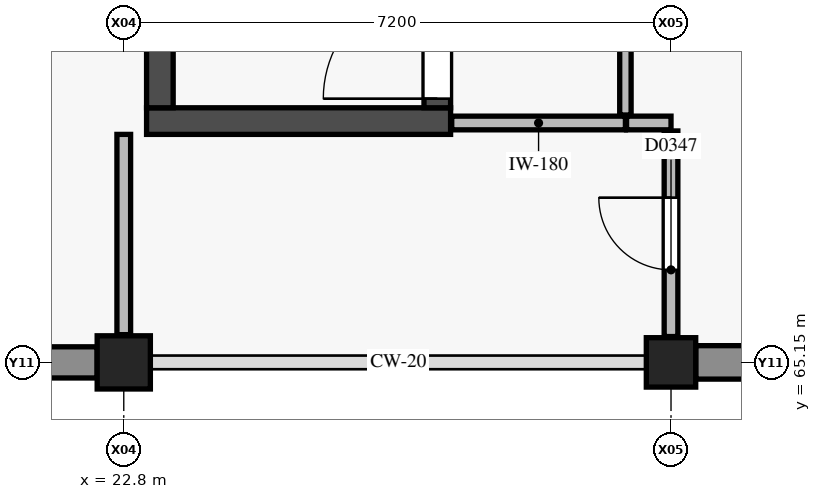
"""IFC4 building model, lengths in metres.
Left out: names, types, materials, properties, quantities, classifications, styles, units other than length and angle.
Written with IfcOpenShell. Run it as: python <this file> out.ifc"""

import sys

from ifc_helpers import new_model, si_unit, direction, frame, frame_2d, origin, origin_2d, place, context, subcontext, project, spatial, rectangle, circle, extrude, element, fill, save


model = new_model("IFC4")
c1 = context("Model", 3, precision=1e-05, world=origin(), true_north=direction((0.0, 1.0)))
c2 = subcontext(c1, "Body", "Model", "MODEL_VIEW")
j1 = project(units=[si_unit("LENGTHUNIT", "METRE"), si_unit("PLANEANGLEUNIT", "RADIAN")], contexts=[c1])
p1 = place(None, origin())
s1 = spatial("IfcSite", under=j1, at=p1, CompositionType="ELEMENT")
p2 = place(p1, origin())
s2 = spatial("IfcBuilding", under=s1, at=p2, CompositionType="ELEMENT")
p3 = place(p2, frame((0.0, 0.0, 4.8)))
s3 = spatial("IfcBuildingStorey", under=s2, at=p3, CompositionType="ELEMENT", Elevation=4.8)
p4 = place(p3, frame((22.8, 65.15, 0.0), z_axis=(0.0, 0.0, 1.0), x_axis=(1.0, 0.0, 0.0)))
e1 = element("IfcColumn", 1, at=p4, inside=s3, PredefinedType="COLUMN", context=c2, shape_type="SweptSolid", body=[
    extrude(circle(Radius=0.35, at=origin_2d()), origin(), (0.0, 0.0, 1.0), 4.2),
])
p5 = place(p3, frame((30.0, 65.15, 0.0), z_axis=(0.0, 0.0, 1.0), x_axis=(1.0, 0.0, 0.0)))
e2 = element("IfcColumn", 2, at=p5, inside=s3, PredefinedType="COLUMN", context=c2, shape_type="SweptSolid", body=[
    extrude(circle(Radius=0.325, at=origin_2d()), origin(), (0.0, 0.0, 1.0), 4.2),
])
p6 = place(p3, frame((23.1, 68.325, 0.0), z_axis=(0.0, 0.0, 1.0), x_axis=(1.0, 0.0, 0.0)))
e3 = element("IfcWall", 3, at=p6, inside=s3, PredefinedType="SHEAR", context=c2, shape_type="SweptSolid", body=[
    extrude(rectangle(XDim=4.0, YDim=0.35, at=frame_2d((2.0, 0.0))), origin(), (0.0, 0.0, 1.0), 3.95),
])
p7 = place(p3, frame((23.275, 68.5, 0.0), z_axis=(0.0, 0.0, 1.0), x_axis=(0.0, 1.0, 0.0)))
e4 = element("IfcWall", 4, at=p7, inside=s3, PredefinedType="SHEAR", context=c2, shape_type="SweptSolid", body=[
    extrude(rectangle(XDim=7.3, YDim=0.35, at=frame_2d((3.65, 0.0))), origin(), (0.0, 0.0, 1.0), 3.95),
])
p8 = place(p3, frame((26.925, 68.5, 0.0), z_axis=(0.0, 0.0, 1.0), x_axis=(0.0, 1.0, 0.0)))
e5 = element("IfcWall", 5, at=p8, inside=s3, PredefinedType="SHEAR", context=c2, shape_type="SweptSolid", body=[
    extrude(rectangle(XDim=7.3, YDim=0.35, at=frame_2d((3.65, 0.0))), origin(), (0.0, 0.0, 1.0), 3.95),
])
p9 = place(p8, frame((0.12, 0.0, 0.0)))
e6 = element("IfcOpeningElement", 6, at=p9, cuts=e5, PredefinedType="OPENING", context=c2, shape_type="SweptSolid", body=[
    extrude(rectangle(XDim=1.5, YDim=2.15, at=frame_2d((0.75, 1.075))), frame((0.0, 0.185, 0.0), z_axis=(0.0, -1.0, 0.0), x_axis=(1.0, 0.0, 0.0)), (0.0, 0.0, 1.0), 0.37),
])
p10 = place(p3, frame((36.95, 65.15, 0.0), z_axis=(0.0, 0.0, 1.0), x_axis=(-1.0, 0.0, 0.0)))
e7 = element("IfcWall", 7, at=p10, inside=s3, PredefinedType="USERDEFINED", context=c2, shape_type="SweptSolid", body=[
    extrude(rectangle(XDim=6.625, YDim=0.44, at=frame_2d((3.312, 0.0))), origin(), (0.0, 0.0, 1.0), 3.13),
])
p11 = place(p10, frame((0.403, 0.0, 0.9)))
e8 = element("IfcOpeningElement", 8, at=p11, cuts=e7, PredefinedType="OPENING", context=c2, shape_type="SweptSolid", body=[
    extrude(rectangle(XDim=1.4, YDim=1.8, at=frame_2d((0.7, 0.9))), frame((0.0, 0.23, 0.0), z_axis=(0.0, -1.0, 0.0), x_axis=(1.0, 0.0, 0.0)), (0.0, 0.0, 1.0), 0.46),
])
p12 = place(p10, frame((2.9, 0.0, 0.95)))
e9 = element("IfcOpeningElement", 9, at=p12, cuts=e7, PredefinedType="OPENING", context=c2, shape_type="SweptSolid", body=[
    extrude(rectangle(XDim=0.9, YDim=1.2, at=frame_2d((0.45, 0.6))), frame((0.0, 0.23, 0.0), z_axis=(0.0, -1.0, 0.0), x_axis=(1.0, 0.0, 0.0)), (0.0, 0.0, 1.0), 0.46),
])
p13 = place(p3, frame((22.45, 65.15, 0.0), z_axis=(0.0, 0.0, 1.0), x_axis=(-1.0, 0.0, 0.0)))
e10 = element("IfcWall", 10, at=p13, inside=s3, PredefinedType="USERDEFINED", context=c2, shape_type="SweptSolid", body=[
    extrude(rectangle(XDim=6.6, YDim=0.41, at=frame_2d((3.3, 0.0))), origin(), (0.0, 0.0, 1.0), 3.13),
])
p14 = place(p13, frame((0.79, 0.0, 0.9)))
e11 = element("IfcOpeningElement", 11, at=p14, cuts=e10, PredefinedType="OPENING", context=c2, shape_type="SweptSolid", body=[
    extrude(rectangle(XDim=1.8, YDim=1.8, at=frame_2d((0.9, 0.9))), frame((0.0, 0.215, 0.0), z_axis=(0.0, -1.0, 0.0), x_axis=(1.0, 0.0, 0.0)), (0.0, 0.0, 1.0), 0.43),
])
p15 = place(p13, frame((4.41, 0.0, 0.9)))
e12 = element("IfcOpeningElement", 12, at=p15, cuts=e10, PredefinedType="OPENING", context=c2, shape_type="SweptSolid", body=[
    extrude(rectangle(XDim=1.2, YDim=1.5, at=frame_2d((0.6, 0.75))), frame((0.0, 0.215, 0.0), z_axis=(0.0, -1.0, 0.0), x_axis=(1.0, 0.0, 0.0)), (0.0, 0.0, 1.0), 0.43),
])
p16 = place(p3, frame((27.115, 68.3, 0.0), z_axis=(0.0, 0.0, 1.0), x_axis=(1.0, 0.0, 0.0)))
e13 = element("IfcWall", 13, at=p16, inside=s3, PredefinedType="PLUMBINGWALL", context=c2, shape_type="SweptSolid", body=[
    extrude(rectangle(XDim=2.285, YDim=0.18, at=frame_2d((1.143, 0.0))), origin(), (0.0, 0.0, 1.0), 3.95),
])
p17 = place(p3, frame((29.415, 68.3, 0.0), z_axis=(0.0, 0.0, 1.0), x_axis=(1.0, 0.0, 0.0)))
e14 = element("IfcWall", 14, at=p17, inside=s3, PredefinedType="PLUMBINGWALL", context=c2, shape_type="SweptSolid", body=[
    extrude(rectangle(XDim=0.585, YDim=0.18, at=frame_2d((0.292, 0.0))), origin(), (0.0, 0.0, 1.0), 3.235),
])
p18 = place(p3, frame((29.4, 68.405, 0.0), z_axis=(0.0, 0.0, 1.0), x_axis=(0.0, 1.0, 0.0)))
e15 = element("IfcWall", 15, at=p18, inside=s3, PredefinedType="PARTITIONING", context=c2, shape_type="SweptSolid", body=[
    extrude(rectangle(XDim=1.595, YDim=0.15, at=frame_2d((0.797, 0.0))), origin(), (0.0, 0.0, 1.0), 3.95),
])
p19 = place(p3, frame((22.8, 65.515, 0.0), z_axis=(0.0, 0.0, 1.0), x_axis=(0.0, 1.0, 0.0)))
e16 = element("IfcWall", 16, at=p19, inside=s3, PredefinedType="PLUMBINGWALL", context=c2, shape_type="SweptSolid", body=[
    extrude(rectangle(XDim=2.635, YDim=0.18, at=frame_2d((1.317, 0.0))), origin(), (0.0, 0.0, 1.0), 3.385),
])
p20 = place(p3, frame((30.0, 65.49, 0.0), z_axis=(0.0, 0.0, 1.0), x_axis=(0.0, 1.0, 0.0)))
e17 = element("IfcWall", 17, at=p20, inside=s3, PredefinedType="PLUMBINGWALL", context=c2, shape_type="SweptSolid", body=[
    extrude(rectangle(XDim=2.705, YDim=0.18, at=frame_2d((1.353, 0.0))), origin(), (0.0, 0.0, 1.0), 3.235),
])
p21 = place(p20, frame((0.877, 0.0, 0.0)))
e18 = element("IfcOpeningElement", 18, at=p21, cuts=e17, PredefinedType="OPENING", context=c2, shape_type="SweptSolid", body=[
    extrude(rectangle(XDim=0.95, YDim=2.1, at=frame_2d((0.475, 1.05))), frame((0.0, 0.1, 0.0), z_axis=(0.0, -1.0, 0.0), x_axis=(1.0, 0.0, 0.0)), (0.0, 0.0, 1.0), 0.2),
])
p22 = place(p9, origin())
e19 = element("IfcDoor", 19, at=p22, inside=s3, OperationType="SINGLE_SWING_LEFT", PredefinedType="DOOR", context=c2, shape_type="SweptSolid", body=[
    extrude(rectangle(XDim=1.5, YDim=2.15, at=frame_2d((0.75, 1.075))), frame((0.0, 0.025, 0.0), z_axis=(0.0, -1.0, 0.0), x_axis=(1.0, 0.0, 0.0)), (0.0, 0.0, 1.0), 0.05),
])
fill(e6, e19)
p23 = place(p21, origin())
e20 = element("IfcDoor", 20, at=p23, inside=s3, OperationType="SINGLE_SWING_RIGHT", PredefinedType="DOOR", context=c2, shape_type="SweptSolid", body=[
    extrude(rectangle(XDim=0.95, YDim=2.1, at=frame_2d((0.475, 1.05))), frame((0.0, 0.025, 0.0), z_axis=(0.0, -1.0, 0.0), x_axis=(1.0, 0.0, 0.0)), (0.0, 0.0, 1.0), 0.05),
])
fill(e18, e20)
save(model, sys.argv[1])
